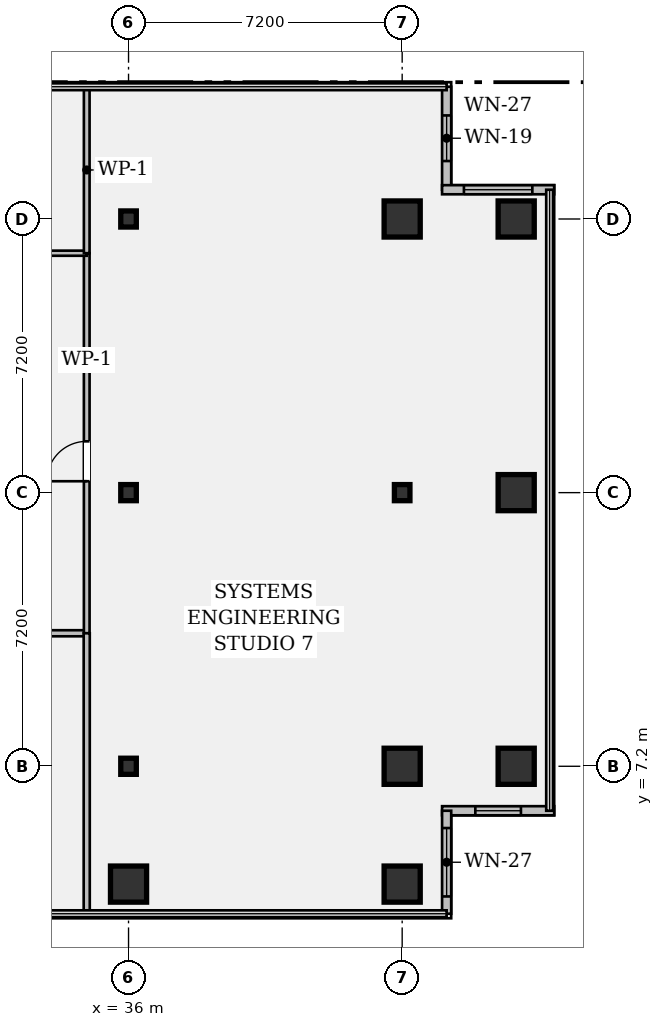
"""IFC4 building model, lengths in metres.
Left out: names, types, materials, properties, quantities, classifications, styles, units other than length and angle.
Written with IfcOpenShell. Run it as: python <this file> out.ifc"""

import sys

from ifc_helpers import new_model, si_unit, direction, frame, frame_2d, origin, origin_2d, place, context, subcontext, project, spatial, rectangle, hollow_rectangle, i_section, extrude, element, fill, save


model = new_model("IFC4")
c1 = context("Model", 3, precision=1e-05, world=origin(), true_north=direction((0.0, 1.0)))
c2 = subcontext(c1, "Body", "Model", "MODEL_VIEW")
j1 = project(units=[si_unit("LENGTHUNIT", "METRE"), si_unit("PLANEANGLEUNIT", "RADIAN")], contexts=[c1])
p1 = place(None, origin())
s1 = spatial("IfcSite", under=j1, at=p1, CompositionType="ELEMENT")
p2 = place(p1, origin())
s2 = spatial("IfcBuilding", under=s1, at=p2, CompositionType="ELEMENT")
p3 = place(p2, frame((0.0, 0.0, 106.05)))
s3 = spatial("IfcBuildingStorey", under=s2, at=p3, CompositionType="ELEMENT", Elevation=106.05)
p4 = place(p3, frame((36.0, 4.1, 0.0), z_axis=(0.0, 0.0, 1.0), x_axis=(1.0, 0.0, 0.0)))
e1 = element("IfcColumn", 1, at=p4, inside=s3, PredefinedType="COLUMN", context=c2, shape_type="SweptSolid", body=[
    extrude(hollow_rectangle(XDim=0.95, YDim=0.95, WallThickness=0.06, at=origin_2d()), origin(), (0.0, 0.0, 1.0), 3.58),
])
for number, where, z_axis, x_axis in (
    (2, (36.0, 7.2, 0.0), (0.0, 0.0, 1.0), (1.0, 0.0, 0.0)),
    (3, (36.0, 14.4, 0.0), (0.0, 0.0, 1.0), (1.0, 0.0, 0.0)),
    (4, (36.0, 21.6, 0.0), (0.0, 0.0, 1.0), (1.0, 0.0, 0.0)),
):
    element("IfcColumn", number, at=place(p3, frame(where, z_axis=z_axis, x_axis=x_axis)), inside=s3, PredefinedType="COLUMN", context=c2, shape_type="SweptSolid", body=[
        extrude(i_section(OverallWidth=0.409, OverallDepth=0.424, WebThickness=0.033, FlangeThickness=0.052, FilletRadius=0.018, at=origin_2d()), origin(), (0.0, 0.0, 1.0), 3.58),
    ])
for number, where, z_axis, x_axis in (
    (5, (43.2, 4.1, 0.0), (0.0, 0.0, 1.0), (1.0, 0.0, 0.0)),
    (6, (43.2, 7.2, 0.0), (0.0, 0.0, 1.0), (1.0, 0.0, 0.0)),
):
    element("IfcColumn", number, at=place(p3, frame(where, z_axis=z_axis, x_axis=x_axis)), inside=s3, PredefinedType="COLUMN", context=c2, shape_type="SweptSolid", body=[
        extrude(hollow_rectangle(XDim=0.95, YDim=0.95, WallThickness=0.06, at=origin_2d()), origin(), (0.0, 0.0, 1.0), 3.58),
    ])
p5 = place(p3, frame((43.2, 14.4, 0.0), z_axis=(0.0, 0.0, 1.0), x_axis=(1.0, 0.0, 0.0)))
e7 = element("IfcColumn", 7, at=p5, inside=s3, PredefinedType="COLUMN", context=c2, shape_type="SweptSolid", body=[
    extrude(i_section(OverallWidth=0.409, OverallDepth=0.424, WebThickness=0.033, FlangeThickness=0.052, FilletRadius=0.018, at=origin_2d()), origin(), (0.0, 0.0, 1.0), 3.58),
])
for number, where, z_axis, x_axis in (
    (8, (43.2, 21.6, 0.0), (0.0, 0.0, 1.0), (1.0, 0.0, 0.0)),
    (9, (46.2, 7.2, 0.0), (0.0, 0.0, 1.0), (1.0, 0.0, 0.0)),
    (10, (46.2, 14.4, 0.0), (0.0, 0.0, 1.0), (1.0, 0.0, 0.0)),
    (11, (46.2, 21.6, 0.0), (0.0, 0.0, 1.0), (1.0, 0.0, 0.0)),
):
    element("IfcColumn", number, at=place(p3, frame(where, z_axis=z_axis, x_axis=x_axis)), inside=s3, PredefinedType="COLUMN", context=c2, shape_type="SweptSolid", body=[
        extrude(hollow_rectangle(XDim=0.95, YDim=0.95, WallThickness=0.06, at=origin_2d()), origin(), (0.0, 0.0, 1.0), 3.58),
    ])
p6 = place(p3, frame((44.37, 25.08, 0.0), z_axis=(0.0, 0.0, 1.0), x_axis=(0.0, -1.0, 0.0)))
e12 = element("IfcWall", 12, at=p6, inside=s3, PredefinedType="STANDARD", context=c2, shape_type="SweptSolid", body=[
    extrude(rectangle(XDim=2.71, YDim=0.24, at=frame_2d((1.355, 0.0))), origin(), (0.0, 0.0, 1.0), 3.58),
])
p7 = place(p6, frame((0.755, 0.0, 0.95)))
e13 = element("IfcOpeningElement", 13, at=p7, cuts=e12, PredefinedType="OPENING", context=c2, shape_type="SweptSolid", body=[
    extrude(rectangle(XDim=1.2, YDim=1.8, at=frame_2d((0.6, 0.9))), frame((0.0, 0.132, 0.0), z_axis=(0.0, -1.0, 0.0), x_axis=(1.0, 0.0, 0.0)), (0.0, 0.0, 1.0), 0.264),
])
p8 = place(p3, frame((44.25, 22.37, 0.0), z_axis=(0.0, 0.0, 1.0), x_axis=(1.0, 0.0, 0.0)))
e14 = element("IfcWall", 14, at=p8, inside=s3, PredefinedType="STANDARD", context=c2, shape_type="SweptSolid", body=[
    extrude(rectangle(XDim=2.95, YDim=0.24, at=frame_2d((1.475, 0.0))), origin(), (0.0, 0.0, 1.0), 3.58),
])
p9 = place(p8, frame((0.575, 0.0, 0.95)))
e15 = element("IfcOpeningElement", 15, at=p9, cuts=e14, PredefinedType="OPENING", context=c2, shape_type="SweptSolid", body=[
    extrude(rectangle(XDim=1.8, YDim=1.35, at=frame_2d((0.9, 0.675))), frame((0.0, 0.132, 0.0), z_axis=(0.0, -1.0, 0.0), x_axis=(1.0, 0.0, 0.0)), (0.0, 0.0, 1.0), 0.264),
])
p10 = place(p3, frame((47.2, 6.03, 0.0), z_axis=(0.0, 0.0, 1.0), x_axis=(-1.0, 0.0, 0.0)))
e16 = element("IfcWall", 16, at=p10, inside=s3, PredefinedType="STANDARD", context=c2, shape_type="SweptSolid", body=[
    extrude(rectangle(XDim=2.95, YDim=0.24, at=frame_2d((1.475, 0.0))), origin(), (0.0, 0.0, 1.0), 3.58),
])
p11 = place(p10, frame((0.875, 0.0, 0.95)))
e17 = element("IfcOpeningElement", 17, at=p11, cuts=e16, PredefinedType="OPENING", context=c2, shape_type="SweptSolid", body=[
    extrude(rectangle(XDim=1.2, YDim=1.8, at=frame_2d((0.6, 0.9))), frame((0.0, 0.132, 0.0), z_axis=(0.0, -1.0, 0.0), x_axis=(1.0, 0.0, 0.0)), (0.0, 0.0, 1.0), 0.264),
])
p12 = place(p3, frame((44.37, 6.03, 0.0), z_axis=(0.0, 0.0, 1.0), x_axis=(0.0, -1.0, 0.0)))
e18 = element("IfcWall", 18, at=p12, inside=s3, PredefinedType="STANDARD", context=c2, shape_type="SweptSolid", body=[
    extrude(rectangle(XDim=2.71, YDim=0.24, at=frame_2d((1.355, 0.0))), origin(), (0.0, 0.0, 1.0), 3.58),
])
p13 = place(p12, frame((0.455, 0.0, 0.95)))
e19 = element("IfcOpeningElement", 19, at=p13, cuts=e18, PredefinedType="OPENING", context=c2, shape_type="SweptSolid", body=[
    extrude(rectangle(XDim=1.8, YDim=1.35, at=frame_2d((0.9, 0.675))), frame((0.0, 0.132, 0.0), z_axis=(0.0, -1.0, 0.0), x_axis=(1.0, 0.0, 0.0)), (0.0, 0.0, 1.0), 0.264),
])
p14 = place(p3, frame((17.35, 10.7, 0.0), z_axis=(0.0, 0.0, 1.0), x_axis=(1.0, 0.0, 0.0)))
e20 = element("IfcWall", 20, at=p14, inside=s3, PredefinedType="PARTITIONING", context=c2, shape_type="SweptSolid", body=[
    extrude(rectangle(XDim=17.55, YDim=0.16, at=frame_2d((8.775, 0.0))), origin(), (0.0, 0.0, 1.0), 2.793),
])
p15 = place(p14, frame((2.82, 0.0, 0.0)))
e21 = element("IfcOpeningElement", 21, at=p15, cuts=e20, PredefinedType="OPENING", context=c2, shape_type="SweptSolid", body=[
    extrude(rectangle(XDim=0.88, YDim=2.15, at=frame_2d((0.44, 1.075))), frame((0.0, 0.092, 0.0), z_axis=(0.0, -1.0, 0.0), x_axis=(1.0, 0.0, 0.0)), (0.0, 0.0, 1.0), 0.184),
])
p16 = place(p14, frame((9.45, 0.0, 0.0)))
e22 = element("IfcOpeningElement", 22, at=p16, cuts=e20, PredefinedType="OPENING", context=c2, shape_type="SweptSolid", body=[
    extrude(rectangle(XDim=0.88, YDim=2.15, at=frame_2d((0.44, 1.075))), frame((0.0, 0.092, 0.0), z_axis=(0.0, -1.0, 0.0), x_axis=(1.0, 0.0, 0.0)), (0.0, 0.0, 1.0), 0.184),
])
p17 = place(p14, frame((14.9, 0.0, 0.0)))
e23 = element("IfcOpeningElement", 23, at=p17, cuts=e20, PredefinedType="OPENING", context=c2, shape_type="SweptSolid", body=[
    extrude(rectangle(XDim=0.88, YDim=2.15, at=frame_2d((0.44, 1.075))), frame((0.0, 0.092, 0.0), z_axis=(0.0, -1.0, 0.0), x_axis=(1.0, 0.0, 0.0)), (0.0, 0.0, 1.0), 0.184),
])
p18 = place(p3, frame((34.9, 10.7, 0.0), z_axis=(0.0, 0.0, 1.0), x_axis=(0.0, 1.0, 0.0)))
e24 = element("IfcWall", 24, at=p18, inside=s3, PredefinedType="PARTITIONING", context=c2, shape_type="SweptSolid", body=[
    extrude(rectangle(XDim=10.0, YDim=0.15, at=frame_2d((5.0, 0.0))), origin(), (0.0, 0.0, 1.0), 2.793),
])
p19 = place(p18, frame((4.0, 0.0, 0.0)))
e25 = element("IfcOpeningElement", 25, at=p19, cuts=e24, PredefinedType="OPENING", context=c2, shape_type="SweptSolid", body=[
    extrude(rectangle(XDim=1.05, YDim=2.15, at=frame_2d((0.525, 1.075))), frame((0.0, 0.087, 0.0), z_axis=(0.0, -1.0, 0.0), x_axis=(1.0, 0.0, 0.0)), (0.0, 0.0, 1.0), 0.174),
])
p20 = place(p3, frame((17.35, 20.7, 0.0), z_axis=(0.0, 0.0, 1.0), x_axis=(1.0, 0.0, 0.0)))
e26 = element("IfcWall", 26, at=p20, inside=s3, PredefinedType="PARTITIONING", context=c2, shape_type="SweptSolid", body=[
    extrude(rectangle(XDim=17.55, YDim=0.135, at=frame_2d((8.775, 0.0))), origin(), (0.0, 0.0, 1.0), 2.793),
])
p21 = place(p20, frame((0.85, 0.0, 0.0)))
e27 = element("IfcOpeningElement", 27, at=p21, cuts=e26, PredefinedType="OPENING", context=c2, shape_type="SweptSolid", body=[
    extrude(rectangle(XDim=0.85, YDim=2.15, at=frame_2d((0.425, 1.075))), frame((0.0, 0.08, 0.0), z_axis=(0.0, -1.0, 0.0), x_axis=(1.0, 0.0, 0.0)), (0.0, 0.0, 1.0), 0.159),
])
p22 = place(p20, frame((4.75, 0.0, 0.0)))
e28 = element("IfcOpeningElement", 28, at=p22, cuts=e26, PredefinedType="OPENING", context=c2, shape_type="SweptSolid", body=[
    extrude(rectangle(XDim=0.85, YDim=2.15, at=frame_2d((0.425, 1.075))), frame((0.0, 0.08, 0.0), z_axis=(0.0, -1.0, 0.0), x_axis=(1.0, 0.0, 0.0)), (0.0, 0.0, 1.0), 0.159),
])
p23 = place(p20, frame((6.81, 0.0, 0.0)))
e29 = element("IfcOpeningElement", 29, at=p23, cuts=e26, PredefinedType="OPENING", context=c2, shape_type="SweptSolid", body=[
    extrude(rectangle(XDim=0.85, YDim=2.15, at=frame_2d((0.425, 1.075))), frame((0.0, 0.08, 0.0), z_axis=(0.0, -1.0, 0.0), x_axis=(1.0, 0.0, 0.0)), (0.0, 0.0, 1.0), 0.159),
])
p24 = place(p20, frame((9.21, 0.0, 0.0)))
e30 = element("IfcOpeningElement", 30, at=p24, cuts=e26, PredefinedType="OPENING", context=c2, shape_type="SweptSolid", body=[
    extrude(rectangle(XDim=0.88, YDim=2.15, at=frame_2d((0.44, 1.075))), frame((0.0, 0.08, 0.0), z_axis=(0.0, -1.0, 0.0), x_axis=(1.0, 0.0, 0.0)), (0.0, 0.0, 1.0), 0.159),
])
p25 = place(p3, frame((34.9, 3.32, 0.0), z_axis=(0.0, 0.0, 1.0), x_axis=(0.0, 1.0, 0.0)))
e31 = element("IfcWall", 31, at=p25, inside=s3, PredefinedType="PARTITIONING", context=c2, shape_type="SweptSolid", body=[
    extrude(rectangle(XDim=7.38, YDim=0.16, at=frame_2d((3.69, 0.0))), origin(), (0.0, 0.0, 1.0), 2.793),
])
p26 = place(p3, frame((34.9, 20.7, 0.0), z_axis=(0.0, 0.0, 1.0), x_axis=(0.0, 1.0, 0.0)))
e32 = element("IfcWall", 32, at=p26, inside=s3, PredefinedType="PARTITIONING", context=c2, shape_type="SweptSolid", body=[
    extrude(rectangle(XDim=4.38, YDim=0.15, at=frame_2d((2.19, 0.0))), origin(), (0.0, 0.0, 1.0), 2.793),
])
p27 = place(p7, origin())
e33 = element("IfcWindow", 33, at=p27, inside=s3, PartitioningType="SINGLE_PANEL", PredefinedType="WINDOW", context=c2, shape_type="SweptSolid", body=[
    extrude(rectangle(XDim=1.2, YDim=1.8, at=frame_2d((0.6, 0.9))), frame((0.0, 0.03, 0.0), z_axis=(0.0, -1.0, 0.0), x_axis=(1.0, 0.0, 0.0)), (0.0, 0.0, 1.0), 0.06),
])
fill(e13, e33)
p28 = place(p9, origin())
e34 = element("IfcWindow", 34, at=p28, inside=s3, PartitioningType="SINGLE_PANEL", PredefinedType="WINDOW", context=c2, shape_type="SweptSolid", body=[
    extrude(rectangle(XDim=1.8, YDim=1.35, at=frame_2d((0.9, 0.675))), frame((0.0, 0.03, 0.0), z_axis=(0.0, -1.0, 0.0), x_axis=(1.0, 0.0, 0.0)), (0.0, 0.0, 1.0), 0.06),
])
fill(e15, e34)
p29 = place(p11, origin())
e35 = element("IfcWindow", 35, at=p29, inside=s3, PartitioningType="SINGLE_PANEL", PredefinedType="WINDOW", context=c2, shape_type="SweptSolid", body=[
    extrude(rectangle(XDim=1.2, YDim=1.8, at=frame_2d((0.6, 0.9))), frame((0.0, 0.03, 0.0), z_axis=(0.0, -1.0, 0.0), x_axis=(1.0, 0.0, 0.0)), (0.0, 0.0, 1.0), 0.06),
])
fill(e17, e35)
p30 = place(p13, origin())
e36 = element("IfcWindow", 36, at=p30, inside=s3, PartitioningType="SINGLE_PANEL", PredefinedType="WINDOW", context=c2, shape_type="SweptSolid", body=[
    extrude(rectangle(XDim=1.8, YDim=1.35, at=frame_2d((0.9, 0.675))), frame((0.0, 0.03, 0.0), z_axis=(0.0, -1.0, 0.0), x_axis=(1.0, 0.0, 0.0)), (0.0, 0.0, 1.0), 0.06),
])
fill(e19, e36)
p31 = place(p19, origin())
e37 = element("IfcDoor", 37, at=p31, inside=s3, OperationType="SINGLE_SWING_LEFT", PredefinedType="DOOR", context=c2, shape_type="SweptSolid", body=[
    extrude(rectangle(XDim=1.05, YDim=2.15, at=frame_2d((0.525, 1.075))), frame((0.0, 0.025, 0.0), z_axis=(0.0, -1.0, 0.0), x_axis=(1.0, 0.0, 0.0)), (0.0, 0.0, 1.0), 0.05),
])
fill(e25, e37)
save(model, sys.argv[1])
